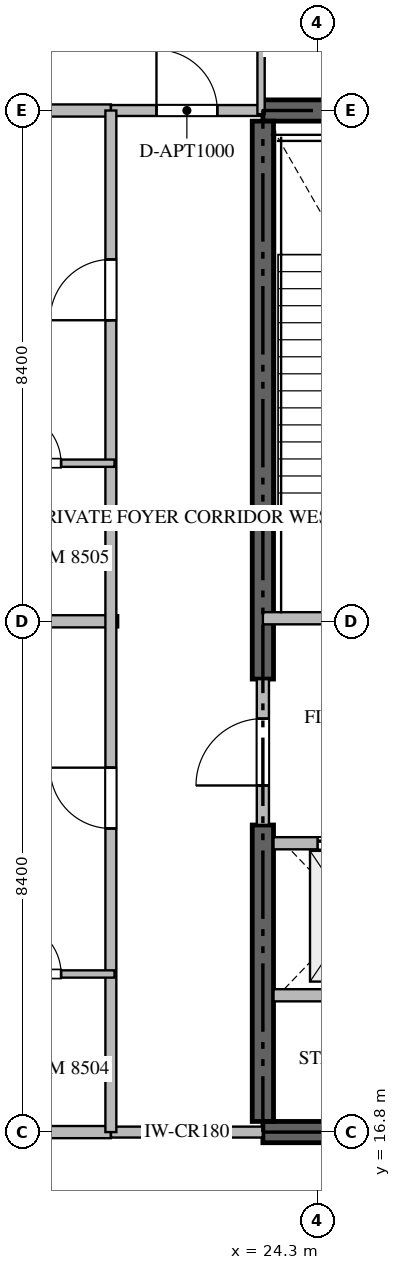
"""IFC4 building model, lengths in metres.
Left out: names, types, materials, properties, quantities, classifications, styles, units other than length and angle.
Written with IfcOpenShell. Run it as: python <this file> out.ifc"""

import sys

from ifc_helpers import new_model, si_unit, direction, frame, frame_2d, origin, place, context, subcontext, project, spatial, rectangle, extrude, source, transform, mapped, element, fill, save


model = new_model("IFC4")
c1 = context("Model", 3, precision=1e-05, world=origin(), true_north=direction((0.0, 1.0)))
c2 = subcontext(c1, "Body", "Model", "MODEL_VIEW")
j1 = project(units=[si_unit("LENGTHUNIT", "METRE"), si_unit("PLANEANGLEUNIT", "RADIAN")], contexts=[c1])
p1 = place(None, origin())
s1 = spatial("IfcSite", under=j1, at=p1, CompositionType="ELEMENT")
p2 = place(p1, origin())
s2 = spatial("IfcBuilding", under=s1, at=p2, CompositionType="ELEMENT")
p3 = place(p2, frame((0.0, 0.0, 342.05)))
s3 = spatial("IfcBuildingStorey", under=s2, at=p3, CompositionType="ELEMENT", Elevation=342.05)
for number, where, z_axis, x_axis in (
    (1, (23.4, 16.8, -0.26), (0.0, 0.0, 1.0), (1.0, 0.0, 0.0)),
    (2, (41.4, 33.6, -0.26), (0.0, 0.0, 1.0), (-1.0, 0.0, 0.0)),
):
    element("IfcWall", number, at=place(p3, frame(where, z_axis=z_axis, x_axis=x_axis)), inside=s3, PredefinedType="SHEAR", context=c2, shape_type="SweptSolid", body=[
        extrude(rectangle(XDim=18.0, YDim=0.35, at=frame_2d((9.0, 0.0))), origin(), (0.0, 0.0, 1.0), 5.898),
    ])
p4 = place(p3, frame((23.4, 16.975, -0.26), z_axis=(0.0, 0.0, 1.0), x_axis=(0.0, 1.0, 0.0)))
e3 = element("IfcWall", 3, at=p4, inside=s3, PredefinedType="SHEAR", context=c2, shape_type="SweptSolid", body=[
    extrude(rectangle(XDim=4.875, YDim=0.35, at=frame_2d((2.438, 0.0))), origin(), (0.0, 0.0, 1.0), 5.898),
])
p5 = place(p3, frame((23.4, 24.25, -0.26), z_axis=(0.0, 0.0, 1.0), x_axis=(0.0, 1.0, 0.0)))
e4 = element("IfcWall", 4, at=p5, inside=s3, PredefinedType="SHEAR", context=c2, shape_type="SweptSolid", body=[
    extrude(rectangle(XDim=9.175, YDim=0.35, at=frame_2d((4.587, 0.0))), origin(), (0.0, 0.0, 1.0), 5.898),
])
p6 = place(p3, frame((23.4, 25.25, 0.0), z_axis=(0.0, 0.0, 1.0), x_axis=(1.0, 0.0, 0.0)))
e5 = element("IfcWall", 5, at=p6, inside=s3, PredefinedType="STANDARD", context=c2, shape_type="SweptSolid", body=[
    extrude(rectangle(XDim=4.45, YDim=0.2, at=frame_2d((2.225, 0.0))), origin(), (0.0, 0.0, 1.0), 5.64),
])
p7 = place(p6, frame((1.65, 0.0, 0.0)))
e6 = element("IfcOpeningElement", 6, at=p7, cuts=e5, PredefinedType="OPENING", context=c2, shape_type="SweptSolid", body=[
    extrude(rectangle(XDim=1.1, YDim=2.15, at=frame_2d((0.55, 1.075))), frame((0.0, 0.11, 0.0), z_axis=(0.0, -1.0, 0.0), x_axis=(1.0, 0.0, 0.0)), (0.0, 0.0, 1.0), 0.22),
])
p8 = place(p3, frame((23.575, 21.55, 0.0), z_axis=(0.0, 0.0, 1.0), x_axis=(1.0, 0.0, 0.0)))
e7 = element("IfcWall", 7, at=p8, inside=s3, PredefinedType="STANDARD", context=c2, shape_type="SweptSolid", body=[
    extrude(rectangle(XDim=2.475, YDim=0.2, at=frame_2d((1.238, 0.0))), origin(), (0.0, 0.0, 1.0), 5.64),
])
p9 = place(p8, frame((0.725, 0.0, 0.0)))
e8 = element("IfcOpeningElement", 8, at=p9, cuts=e7, PredefinedType="OPENING", context=c2, shape_type="SweptSolid", body=[
    extrude(rectangle(XDim=1.2, YDim=2.2, at=frame_2d((0.6, 1.1))), frame((0.0, 0.11, 0.0), z_axis=(0.0, -1.0, 0.0), x_axis=(1.0, 0.0, 0.0)), (0.0, 0.0, 1.0), 0.22),
])
p10 = place(p3, frame((23.575, 19.05, 0.0), z_axis=(0.0, 0.0, 1.0), x_axis=(1.0, 0.0, 0.0)))
e9 = element("IfcWall", 9, at=p10, inside=s3, PredefinedType="STANDARD", context=c2, shape_type="SweptSolid", body=[
    extrude(rectangle(XDim=2.475, YDim=0.2, at=frame_2d((1.238, 0.0))), origin(), (0.0, 0.0, 1.0), 5.64),
])
p11 = place(p3, frame((23.4, 21.852, 0.0), z_axis=(0.0, 0.0, 1.0), x_axis=(0.0, 1.0, 0.0)))
e10 = element("IfcWall", 10, at=p11, inside=s3, PredefinedType="STANDARD", context=c2, shape_type="SweptSolid", body=[
    extrude(rectangle(XDim=2.396, YDim=0.2, at=frame_2d((1.198, 0.0))), origin(), (0.0, 0.0, 1.0), 5.64),
])
p12 = place(p11, frame((0.648, 0.0, 0.0)))
e11 = element("IfcOpeningElement", 11, at=p12, cuts=e10, PredefinedType="OPENING", context=c2, shape_type="SweptSolid", body=[
    extrude(rectangle(XDim=1.1, YDim=2.15, at=frame_2d((0.55, 1.075))), frame((0.0, 0.11, 0.0), z_axis=(0.0, -1.0, 0.0), x_axis=(1.0, 0.0, 0.0)), (0.0, 0.0, 1.0), 0.22),
])
p13 = place(p3, frame((10.882, 25.2, 0.0), z_axis=(0.0, 0.0, 1.0), x_axis=(1.0, 0.0, 0.0)))
e12 = element("IfcWall", 12, at=p13, inside=s3, PredefinedType="PARTITIONING", context=c2, shape_type="SweptSolid", body=[
    extrude(rectangle(XDim=10.138, YDim=0.2, at=frame_2d((5.069, 0.0))), origin(), (0.0, 0.0, 1.0), 5.64),
])
for number, where, z_axis, x_axis in (
    (13, (10.882, 16.8, 0.0), (0.0, 0.0, 1.0), (1.0, 0.0, 0.0)),
    (14, (10.882, 33.6, 0.0), (0.0, 0.0, 1.0), (1.0, 0.0, 0.0)),
):
    element("IfcWall", number, at=place(p3, frame(where, z_axis=z_axis, x_axis=x_axis)), inside=s3, PredefinedType="PARTITIONING", context=c2, shape_type="SweptSolid", body=[
        extrude(rectangle(XDim=10.018, YDim=0.2, at=frame_2d((5.009, 0.0))), origin(), (0.0, 0.0, 1.0), 5.64),
    ])
p14 = place(p3, frame((20.902, 16.8, 0.0), z_axis=(0.0, 0.0, 1.0), x_axis=(1.0, 0.0, 0.0)))
e15 = element("IfcWall", 15, at=p14, inside=s3, PredefinedType="PARTITIONING", context=c2, shape_type="SweptSolid", body=[
    extrude(rectangle(XDim=2.496, YDim=0.18, at=frame_2d((1.248, 0.0))), origin(), (0.0, 0.0, 1.0), 5.64),
])
p15 = place(p3, frame((20.902, 33.6, 0.0), z_axis=(0.0, 0.0, 1.0), x_axis=(1.0, 0.0, 0.0)))
e16 = element("IfcWall", 16, at=p15, inside=s3, PredefinedType="PARTITIONING", context=c2, shape_type="SweptSolid", body=[
    extrude(rectangle(XDim=2.496, YDim=0.18, at=frame_2d((1.248, 0.0))), origin(), (0.0, 0.0, 1.0), 5.64),
])
p16 = place(p15, frame((0.748, 0.0, 0.0)))
e17 = element("IfcOpeningElement", 17, at=p16, cuts=e16, PredefinedType="OPENING", context=c2, shape_type="SweptSolid", body=[
    extrude(rectangle(XDim=1.0, YDim=2.15, at=frame_2d((0.5, 1.075))), frame((0.0, 0.1, 0.0), z_axis=(0.0, -1.0, 0.0), x_axis=(1.0, 0.0, 0.0)), (0.0, 0.0, 1.0), 0.2),
])
p17 = place(p3, frame((20.9, 16.8, 0.0), z_axis=(0.0, 0.0, 1.0), x_axis=(0.0, 1.0, 0.0)))
e18 = element("IfcWall", 18, at=p17, inside=s3, PredefinedType="PARTITIONING", context=c2, shape_type="SweptSolid", body=[
    extrude(rectangle(XDim=16.8, YDim=0.18, at=frame_2d((8.4, 0.0))), origin(), (0.0, 0.0, 1.0), 5.64),
])
p18 = place(p17, frame((4.993, 0.0, 0.0)))
e19 = element("IfcOpeningElement", 19, at=p18, cuts=e18, PredefinedType="OPENING", context=c2, shape_type="SweptSolid", body=[
    extrude(rectangle(XDim=1.0, YDim=2.15, at=frame_2d((0.5, 1.075))), frame((0.0, 0.1, 0.0), z_axis=(0.0, -1.0, 0.0), x_axis=(1.0, 0.0, 0.0)), (0.0, 0.0, 1.0), 0.2),
])
p19 = place(p17, frame((13.351, 0.0, 0.0)))
e20 = element("IfcOpeningElement", 20, at=p19, cuts=e18, PredefinedType="OPENING", context=c2, shape_type="SweptSolid", body=[
    extrude(rectangle(XDim=1.0, YDim=2.15, at=frame_2d((0.5, 1.075))), frame((0.0, 0.1, 0.0), z_axis=(0.0, -1.0, 0.0), x_axis=(1.0, 0.0, 0.0)), (0.0, 0.0, 1.0), 0.2),
])
p20 = place(p3, frame((23.37, 36.35, 0.0), z_axis=(0.0, 0.0, 1.0), x_axis=(0.0, -1.0, 0.0)))
e21 = element("IfcWall", 21, at=p20, inside=s3, PredefinedType="PARTITIONING", context=c2, shape_type="SweptSolid", body=[
    extrude(rectangle(XDim=2.81, YDim=0.12, at=frame_2d((1.405, 0.0))), origin(), (0.0, 0.0, 1.0), 5.64),
])
p21 = place(p3, frame((18.352, 19.4, 0.0), z_axis=(0.0, 0.0, 1.0), x_axis=(1.0, 0.0, 0.0)))
e22 = element("IfcWall", 22, at=p21, inside=s3, PredefinedType="PARTITIONING", context=c2, shape_type="SweptSolid", body=[
    extrude(rectangle(XDim=2.608, YDim=0.12, at=frame_2d((1.304, 0.0))), origin(), (0.0, 0.0, 1.0), 5.64),
])
p22 = place(p21, frame((0.879, 0.0, 0.0)))
e23 = element("IfcOpeningElement", 23, at=p22, cuts=e22, PredefinedType="OPENING", context=c2, shape_type="SweptSolid", body=[
    extrude(rectangle(XDim=0.85, YDim=2.1, at=frame_2d((0.425, 1.05))), frame((0.0, 0.07, 0.0), z_axis=(0.0, -1.0, 0.0), x_axis=(1.0, 0.0, 0.0)), (0.0, 0.0, 1.0), 0.14),
])
p23 = place(p3, frame((18.352, 27.8, 0.0), z_axis=(0.0, 0.0, 1.0), x_axis=(1.0, 0.0, 0.0)))
e24 = element("IfcWall", 24, at=p23, inside=s3, PredefinedType="PARTITIONING", context=c2, shape_type="SweptSolid", body=[
    extrude(rectangle(XDim=2.608, YDim=0.12, at=frame_2d((1.304, 0.0))), origin(), (0.0, 0.0, 1.0), 5.64),
])
p24 = place(p23, frame((0.879, 0.0, 0.0)))
e25 = element("IfcOpeningElement", 25, at=p24, cuts=e24, PredefinedType="OPENING", context=c2, shape_type="SweptSolid", body=[
    extrude(rectangle(XDim=0.85, YDim=2.1, at=frame_2d((0.425, 1.05))), frame((0.0, 0.07, 0.0), z_axis=(0.0, -1.0, 0.0), x_axis=(1.0, 0.0, 0.0)), (0.0, 0.0, 1.0), 0.14),
])
m1 = source(origin(), c2, "Body", "SweptSolid", [
    extrude(rectangle(XDim=1.2, YDim=2.2, at=frame_2d((0.6, 1.1))), frame((0.0, 0.025, 0.0), z_axis=(0.0, -1.0, 0.0), x_axis=(1.0, 0.0, 0.0)), (0.0, 0.0, 1.0), 0.05),
])
p25 = place(p9, origin())
e26 = element("IfcDoor", 26, at=p25, inside=s3, OperationType="DOUBLE_DOOR_SLIDING", PredefinedType="DOOR", context=c2, shape_type="MappedRepresentation", body=[
    mapped(m1, transform((0.0, 0.0, 0.0), scale=1.0)),
])
fill(e8, e26)
m2 = source(origin(), c2, "Body", "SweptSolid", [
    extrude(rectangle(XDim=1.1, YDim=2.15, at=frame_2d((0.55, 1.075))), frame((0.0, 0.025, 0.0), z_axis=(0.0, -1.0, 0.0), x_axis=(1.0, 0.0, 0.0)), (0.0, 0.0, 1.0), 0.05),
])
p26 = place(p12, origin())
e27 = element("IfcDoor", 27, at=p26, inside=s3, OperationType="SINGLE_SWING_LEFT", PredefinedType="DOOR", context=c2, shape_type="MappedRepresentation", body=[
    mapped(m2, transform((0.0, 0.0, 0.0), scale=1.0)),
])
fill(e11, e27)
m3 = source(origin(), c2, "Body", "SweptSolid", [
    extrude(rectangle(XDim=1.0, YDim=2.15, at=frame_2d((0.5, 1.075))), frame((0.0, 0.025, 0.0), z_axis=(0.0, -1.0, 0.0), x_axis=(1.0, 0.0, 0.0)), (0.0, 0.0, 1.0), 0.05),
])
p27 = place(p16, origin())
e28 = element("IfcDoor", 28, at=p27, inside=s3, OperationType="SINGLE_SWING_LEFT", PredefinedType="DOOR", context=c2, shape_type="MappedRepresentation", body=[
    mapped(m3, transform((0.0, 0.0, 0.0), scale=1.0)),
])
fill(e17, e28)
p28 = place(p18, origin())
e29 = element("IfcDoor", 29, at=p28, inside=s3, OperationType="SINGLE_SWING_RIGHT", PredefinedType="DOOR", context=c2, shape_type="MappedRepresentation", body=[
    mapped(m3, transform((0.0, 0.0, 0.0), scale=1.0)),
])
fill(e19, e29)
p29 = place(p19, origin())
e30 = element("IfcDoor", 30, at=p29, inside=s3, OperationType="SINGLE_SWING_LEFT", PredefinedType="DOOR", context=c2, shape_type="MappedRepresentation", body=[
    mapped(m3, transform((0.0, 0.0, 0.0), scale=1.0)),
])
fill(e20, e30)
m4 = source(origin(), c2, "Body", "SweptSolid", [
    extrude(rectangle(XDim=0.85, YDim=2.1, at=frame_2d((0.425, 1.05))), frame((0.0, 0.025, 0.0), z_axis=(0.0, -1.0, 0.0), x_axis=(1.0, 0.0, 0.0)), (0.0, 0.0, 1.0), 0.05),
])
p30 = place(p22, origin())
e31 = element("IfcDoor", 31, at=p30, inside=s3, OperationType="SINGLE_SWING_LEFT", PredefinedType="DOOR", context=c2, shape_type="MappedRepresentation", body=[
    mapped(m4, transform((0.0, 0.0, 0.0), scale=1.0)),
])
fill(e23, e31)
p31 = place(p24, origin())
e32 = element("IfcDoor", 32, at=p31, inside=s3, OperationType="SINGLE_SWING_LEFT", PredefinedType="DOOR", context=c2, shape_type="MappedRepresentation", body=[
    mapped(m4, transform((0.0, 0.0, 0.0), scale=1.0)),
])
fill(e25, e32)
save(model, sys.argv[1])
